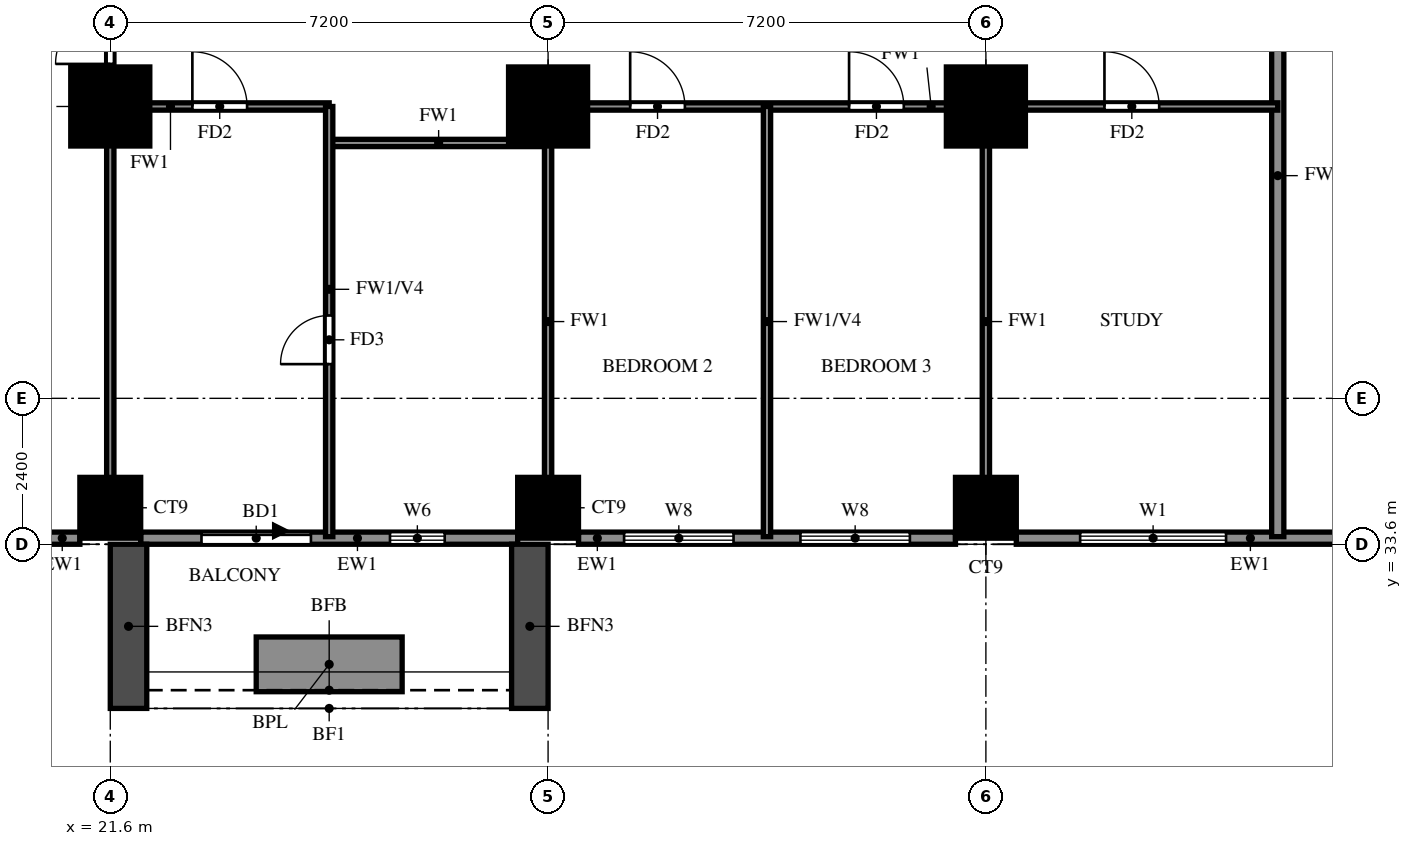
"""IFC4 building model, lengths in metres.
Left out: names, types, materials, properties, quantities, classifications, styles, units other than length and angle.
Written with IfcOpenShell. Run it as: python <this file> out.ifc"""

import sys

from ifc_helpers import new_model, si_unit, direction, frame, frame_2d, origin, origin_2d, place, context, subcontext, project, spatial, rectangle, extrude, source, transform, mapped, element, fill, save


model = new_model("IFC4")
c1 = context("Model", 3, precision=1e-05, world=origin(), true_north=direction((0.0, 1.0)))
c2 = subcontext(c1, "Body", "Model", "MODEL_VIEW")
j1 = project(units=[si_unit("LENGTHUNIT", "METRE"), si_unit("PLANEANGLEUNIT", "RADIAN")], contexts=[c1])
p1 = place(None, origin())
s1 = spatial("IfcSite", under=j1, at=p1, CompositionType="ELEMENT")
p2 = place(p1, origin())
s2 = spatial("IfcBuilding", under=s1, at=p2, CompositionType="ELEMENT")
p3 = place(p2, frame((0.0, 0.0, 72.5)))
s3 = spatial("IfcBuildingStorey", under=s2, at=p3, CompositionType="ELEMENT", Elevation=72.5)
m1 = source(origin(), c2, "Body", "SweptSolid", [
    extrude(rectangle(XDim=1.0, YDim=1.0, at=origin_2d()), origin(), (0.0, 0.0, 1.0), 3.18),
])
for number, where, z_axis, x_axis in (
    (1, (21.6, 34.2, 0.0), (0.0, 0.0, 1.0), (1.0, 0.0, 0.0)),
    (2, (28.8, 34.2, 0.0), (0.0, 0.0, 1.0), (1.0, 0.0, 0.0)),
    (3, (36.0, 34.2, 0.0), (0.0, 0.0, 1.0), (1.0, 0.0, 0.0)),
):
    element("IfcColumn", number, at=place(p3, frame(where, z_axis=z_axis, x_axis=x_axis)), inside=s3, PredefinedType="COLUMN", context=c2, shape_type="MappedRepresentation", body=[
        mapped(m1, transform((0.0, 0.0, 0.0))),
    ])
m2 = source(origin(), c2, "Body", "SweptSolid", [
    extrude(rectangle(XDim=1.3, YDim=1.3, at=origin_2d()), origin(), (0.0, 0.0, 1.0), 3.18),
])
for number, where, z_axis, x_axis in (
    (4, (21.6, 40.8, 0.0), (0.0, 0.0, 1.0), (1.0, 0.0, 0.0)),
    (5, (28.8, 40.8, 0.0), (0.0, 0.0, 1.0), (1.0, 0.0, 0.0)),
    (6, (36.0, 40.8, 0.0), (0.0, 0.0, 1.0), (1.0, 0.0, 0.0)),
):
    element("IfcColumn", number, at=place(p3, frame(where, z_axis=z_axis, x_axis=x_axis)), inside=s3, PredefinedType="COLUMN", context=c2, shape_type="MappedRepresentation", body=[
        mapped(m2, transform((0.0, 0.0, 0.0))),
    ])
p4 = place(p3, frame((18.2, 33.7, 0.0), z_axis=(0.0, 0.0, 1.0), x_axis=(1.0, 0.0, 0.0)))
e7 = element("IfcWall", 7, at=p4, inside=s3, PredefinedType="SOLIDWALL", context=c2, shape_type="SweptSolid", body=[
    extrude(rectangle(XDim=2.9, YDim=0.2, at=frame_2d((1.45, 0.0))), origin(), (0.0, 0.0, 1.0), 3.18),
])
p5 = place(p4, frame((0.55, 0.0, 0.6)))
e8 = element("IfcOpeningElement", 8, at=p5, cuts=e7, PredefinedType="OPENING", context=c2, shape_type="SweptSolid", body=[
    extrude(rectangle(XDim=1.8, YDim=2.4, at=frame_2d((0.9, 1.2))), frame((0.0, 0.11, 0.0), z_axis=(0.0, -1.0, 0.0), x_axis=(1.0, 0.0, 0.0)), (0.0, 0.0, 1.0), 0.22),
])
p6 = place(p3, frame((22.1, 33.7, 0.0), z_axis=(0.0, 0.0, 1.0), x_axis=(1.0, 0.0, 0.0)))
e9 = element("IfcWall", 9, at=p6, inside=s3, PredefinedType="SOLIDWALL", context=c2, shape_type="SweptSolid", body=[
    extrude(rectangle(XDim=6.2, YDim=0.2, at=frame_2d((3.1, 0.0))), origin(), (0.0, 0.0, 1.0), 3.18),
])
p7 = place(p6, frame((1.0, 0.0, 0.0)))
e10 = element("IfcOpeningElement", 10, at=p7, cuts=e9, PredefinedType="OPENING", context=c2, shape_type="SweptSolid", body=[
    extrude(rectangle(XDim=1.8, YDim=2.4, at=frame_2d((0.9, 1.2))), frame((0.0, 0.11, 0.0), z_axis=(0.0, -1.0, 0.0), x_axis=(1.0, 0.0, 0.0)), (0.0, 0.0, 1.0), 0.22),
])
p8 = place(p6, frame((4.1, 0.0, 1.5)))
e11 = element("IfcOpeningElement", 11, at=p8, cuts=e9, PredefinedType="OPENING", context=c2, shape_type="SweptSolid", body=[
    extrude(rectangle(XDim=0.9, YDim=0.9, at=frame_2d((0.45, 0.45))), frame((0.0, 0.11, 0.0), z_axis=(0.0, -1.0, 0.0), x_axis=(1.0, 0.0, 0.0)), (0.0, 0.0, 1.0), 0.22),
])
p9 = place(p3, frame((29.3, 33.7, 0.0), z_axis=(0.0, 0.0, 1.0), x_axis=(1.0, 0.0, 0.0)))
e12 = element("IfcWall", 12, at=p9, inside=s3, PredefinedType="SOLIDWALL", context=c2, shape_type="SweptSolid", body=[
    extrude(rectangle(XDim=6.2, YDim=0.2, at=frame_2d((3.1, 0.0))), origin(), (0.0, 0.0, 1.0), 3.18),
])
p10 = place(p9, frame((0.75, 0.0, 0.6)))
e13 = element("IfcOpeningElement", 13, at=p10, cuts=e12, PredefinedType="OPENING", context=c2, shape_type="SweptSolid", body=[
    extrude(rectangle(XDim=1.8, YDim=2.4, at=frame_2d((0.9, 1.2))), frame((0.0, 0.11, 0.0), z_axis=(0.0, -1.0, 0.0), x_axis=(1.0, 0.0, 0.0)), (0.0, 0.0, 1.0), 0.22),
])
p11 = place(p9, frame((3.65, 0.0, 0.6)))
e14 = element("IfcOpeningElement", 14, at=p11, cuts=e12, PredefinedType="OPENING", context=c2, shape_type="SweptSolid", body=[
    extrude(rectangle(XDim=1.8, YDim=2.4, at=frame_2d((0.9, 1.2))), frame((0.0, 0.11, 0.0), z_axis=(0.0, -1.0, 0.0), x_axis=(1.0, 0.0, 0.0)), (0.0, 0.0, 1.0), 0.22),
])
p12 = place(p3, frame((36.5, 33.7, 0.0), z_axis=(0.0, 0.0, 1.0), x_axis=(1.0, 0.0, 0.0)))
e15 = element("IfcWall", 15, at=p12, inside=s3, PredefinedType="SOLIDWALL", context=c2, shape_type="SweptSolid", body=[
    extrude(rectangle(XDim=5.5, YDim=0.2, at=frame_2d((2.75, 0.0))), origin(), (0.0, 0.0, 1.0), 3.18),
])
p13 = place(p12, frame((1.05, 0.0, 0.6)))
e16 = element("IfcOpeningElement", 16, at=p13, cuts=e15, PredefinedType="OPENING", context=c2, shape_type="SweptSolid", body=[
    extrude(rectangle(XDim=2.4, YDim=2.4, at=frame_2d((1.2, 1.2))), frame((0.0, 0.11, 0.0), z_axis=(0.0, -1.0, 0.0), x_axis=(1.0, 0.0, 0.0)), (0.0, 0.0, 1.0), 0.22),
])
for number, where, z_axis, x_axis in (
    (17, (21.9, 33.6, 0.0), (0.0, 0.0, 1.0), (0.0, -1.0, 0.0)),
    (18, (28.5, 33.6, 0.0), (0.0, 0.0, 1.0), (0.0, -1.0, 0.0)),
):
    element("IfcWall", number, at=place(p3, frame(where, z_axis=z_axis, x_axis=x_axis)), inside=s3, PredefinedType="SOLIDWALL", context=c2, shape_type="SweptSolid", body=[
        extrude(rectangle(XDim=2.7, YDim=0.6, at=frame_2d((1.35, 0.0))), origin(), (0.0, 0.0, 1.0), 2.85),
    ])
p14 = place(p3, frame((24.0, 31.625, 0.0), z_axis=(0.0, 0.0, 1.0), x_axis=(1.0, 0.0, 0.0)))
e19 = element("IfcWall", 19, at=p14, inside=s3, PredefinedType="SOLIDWALL", context=c2, shape_type="SweptSolid", body=[
    extrude(rectangle(XDim=2.4, YDim=0.9, at=frame_2d((1.2, 0.0))), origin(), (0.0, 0.0, 1.0), 0.9),
])
p15 = place(p3, frame((40.8, 33.725, 0.0), z_axis=(0.0, 0.0, 1.0), x_axis=(0.0, 1.0, 0.0)))
e20 = element("IfcWall", 20, at=p15, inside=s3, PredefinedType="SOLIDWALL", context=c2, shape_type="SweptSolid", body=[
    extrude(rectangle(XDim=11.875, YDim=0.2, at=frame_2d((5.938, 0.0))), origin(), (0.0, 0.0, 1.0), 2.28),
])
p16 = place(p3, frame((25.2, 40.2, 0.0), z_axis=(0.0, 0.0, 1.0), x_axis=(1.0, 0.0, 0.0)))
e21 = element("IfcWall", 21, at=p16, inside=s3, PredefinedType="PARTITIONING", context=c2, shape_type="SweptSolid", body=[
    extrude(rectangle(XDim=3.6, YDim=0.12, at=frame_2d((1.8, 0.0))), origin(), (0.0, 0.0, 1.0), 3.18),
])
p17 = place(p3, frame((21.6, 40.8, 0.0), z_axis=(0.0, 0.0, 1.0), x_axis=(1.0, 0.0, 0.0)))
e22 = element("IfcWall", 22, at=p17, inside=s3, PredefinedType="PARTITIONING", context=c2, shape_type="SweptSolid", body=[
    extrude(rectangle(XDim=3.6, YDim=0.12, at=frame_2d((1.8, 0.0))), origin(), (0.0, 0.0, 1.0), 3.18),
])
p18 = place(p17, frame((1.35, 0.0, 0.0)))
e23 = element("IfcOpeningElement", 23, at=p18, cuts=e22, PredefinedType="OPENING", context=c2, shape_type="SweptSolid", body=[
    extrude(rectangle(XDim=0.9, YDim=2.1, at=frame_2d((0.45, 1.05))), frame((0.0, 0.07, 0.0), z_axis=(0.0, -1.0, 0.0), x_axis=(1.0, 0.0, 0.0)), (0.0, 0.0, 1.0), 0.14),
])
p19 = place(p3, frame((28.8, 40.8, 0.0), z_axis=(0.0, 0.0, 1.0), x_axis=(1.0, 0.0, 0.0)))
e24 = element("IfcWall", 24, at=p19, inside=s3, PredefinedType="PARTITIONING", context=c2, shape_type="SweptSolid", body=[
    extrude(rectangle(XDim=12.0, YDim=0.12, at=frame_2d((6.0, 0.0))), origin(), (0.0, 0.0, 1.0), 3.18),
])
p20 = place(p19, frame((1.35, 0.0, 0.0)))
e25 = element("IfcOpeningElement", 25, at=p20, cuts=e24, PredefinedType="OPENING", context=c2, shape_type="SweptSolid", body=[
    extrude(rectangle(XDim=0.9, YDim=2.1, at=frame_2d((0.45, 1.05))), frame((0.0, 0.07, 0.0), z_axis=(0.0, -1.0, 0.0), x_axis=(1.0, 0.0, 0.0)), (0.0, 0.0, 1.0), 0.14),
])
p21 = place(p19, frame((4.95, 0.0, 0.0)))
e26 = element("IfcOpeningElement", 26, at=p21, cuts=e24, PredefinedType="OPENING", context=c2, shape_type="SweptSolid", body=[
    extrude(rectangle(XDim=0.9, YDim=2.1, at=frame_2d((0.45, 1.05))), frame((0.0, 0.07, 0.0), z_axis=(0.0, -1.0, 0.0), x_axis=(1.0, 0.0, 0.0)), (0.0, 0.0, 1.0), 0.14),
])
p22 = place(p19, frame((9.15, 0.0, 0.0)))
e27 = element("IfcOpeningElement", 27, at=p22, cuts=e24, PredefinedType="OPENING", context=c2, shape_type="SweptSolid", body=[
    extrude(rectangle(XDim=0.9, YDim=2.1, at=frame_2d((0.45, 1.05))), frame((0.0, 0.07, 0.0), z_axis=(0.0, -1.0, 0.0), x_axis=(1.0, 0.0, 0.0)), (0.0, 0.0, 1.0), 0.14),
])
p23 = place(p3, frame((21.6, 33.725, 0.0), z_axis=(0.0, 0.0, 1.0), x_axis=(0.0, 1.0, 0.0)))
e28 = element("IfcWall", 28, at=p23, inside=s3, PredefinedType="PARTITIONING", context=c2, shape_type="SweptSolid", body=[
    extrude(rectangle(XDim=39.475, YDim=0.12, at=frame_2d((19.737, 0.0))), origin(), (0.0, 0.0, 1.0), 3.18),
])
p24 = place(p23, frame((7.775, 0.0, 0.0)))
e29 = element("IfcOpeningElement", 29, at=p24, cuts=e28, PredefinedType="OPENING", context=c2, shape_type="SweptSolid", body=[
    extrude(rectangle(XDim=0.9, YDim=2.1, at=frame_2d((0.45, 1.05))), frame((0.0, 0.07, 0.0), z_axis=(0.0, -1.0, 0.0), x_axis=(1.0, 0.0, 0.0)), (0.0, 0.0, 1.0), 0.14),
])
p25 = place(p23, frame((17.125, 0.0, 0.0)))
e30 = element("IfcOpeningElement", 30, at=p25, cuts=e28, PredefinedType="OPENING", context=c2, shape_type="SweptSolid", body=[
    extrude(rectangle(XDim=1.5, YDim=2.1, at=frame_2d((0.75, 1.05))), frame((0.0, 0.07, 0.0), z_axis=(0.0, -1.0, 0.0), x_axis=(1.0, 0.0, 0.0)), (0.0, 0.0, 1.0), 0.14),
])
p26 = place(p23, frame((22.825, 0.0, 0.0)))
e31 = element("IfcOpeningElement", 31, at=p26, cuts=e28, PredefinedType="OPENING", context=c2, shape_type="SweptSolid", body=[
    extrude(rectangle(XDim=0.9, YDim=2.1, at=frame_2d((0.45, 1.05))), frame((0.0, 0.07, 0.0), z_axis=(0.0, -1.0, 0.0), x_axis=(1.0, 0.0, 0.0)), (0.0, 0.0, 1.0), 0.14),
])
p27 = place(p23, frame((26.425, 0.0, 0.0)))
e32 = element("IfcOpeningElement", 32, at=p27, cuts=e28, PredefinedType="OPENING", context=c2, shape_type="SweptSolid", body=[
    extrude(rectangle(XDim=0.9, YDim=2.1, at=frame_2d((0.45, 1.05))), frame((0.0, 0.07, 0.0), z_axis=(0.0, -1.0, 0.0), x_axis=(1.0, 0.0, 0.0)), (0.0, 0.0, 1.0), 0.14),
])
p28 = place(p23, frame((30.025, 0.0, 0.0)))
e33 = element("IfcOpeningElement", 33, at=p28, cuts=e28, PredefinedType="OPENING", context=c2, shape_type="SweptSolid", body=[
    extrude(rectangle(XDim=0.9, YDim=2.1, at=frame_2d((0.45, 1.05))), frame((0.0, 0.07, 0.0), z_axis=(0.0, -1.0, 0.0), x_axis=(1.0, 0.0, 0.0)), (0.0, 0.0, 1.0), 0.14),
])
p29 = place(p23, frame((33.625, 0.0, 0.0)))
e34 = element("IfcOpeningElement", 34, at=p29, cuts=e28, PredefinedType="OPENING", context=c2, shape_type="SweptSolid", body=[
    extrude(rectangle(XDim=0.9, YDim=2.1, at=frame_2d((0.45, 1.05))), frame((0.0, 0.07, 0.0), z_axis=(0.0, -1.0, 0.0), x_axis=(1.0, 0.0, 0.0)), (0.0, 0.0, 1.0), 0.14),
])
p30 = place(p23, frame((37.225, 0.0, 0.0)))
e35 = element("IfcOpeningElement", 35, at=p30, cuts=e28, PredefinedType="OPENING", context=c2, shape_type="SweptSolid", body=[
    extrude(rectangle(XDim=0.9, YDim=2.1, at=frame_2d((0.45, 1.05))), frame((0.0, 0.07, 0.0), z_axis=(0.0, -1.0, 0.0), x_axis=(1.0, 0.0, 0.0)), (0.0, 0.0, 1.0), 0.14),
])
p31 = place(p3, frame((25.2, 33.725, 0.0), z_axis=(0.0, 0.0, 1.0), x_axis=(0.0, 1.0, 0.0)))
e36 = element("IfcWall", 36, at=p31, inside=s3, PredefinedType="PARTITIONING", context=c2, shape_type="SweptSolid", body=[
    extrude(rectangle(XDim=7.075, YDim=0.12, at=frame_2d((3.538, 0.0))), origin(), (0.0, 0.0, 1.0), 2.28),
])
p32 = place(p31, frame((2.837, 0.0, 0.0)))
e37 = element("IfcOpeningElement", 37, at=p32, cuts=e36, PredefinedType="OPENING", context=c2, shape_type="SweptSolid", body=[
    extrude(rectangle(XDim=0.8, YDim=2.1, at=frame_2d((0.4, 1.05))), frame((0.0, 0.07, 0.0), z_axis=(0.0, -1.0, 0.0), x_axis=(1.0, 0.0, 0.0)), (0.0, 0.0, 1.0), 0.14),
])
p33 = place(p3, frame((28.8, 33.725, 0.0), z_axis=(0.0, 0.0, 1.0), x_axis=(0.0, 1.0, 0.0)))
e38 = element("IfcWall", 38, at=p33, inside=s3, PredefinedType="PARTITIONING", context=c2, shape_type="SweptSolid", body=[
    extrude(rectangle(XDim=7.075, YDim=0.12, at=frame_2d((3.538, 0.0))), origin(), (0.0, 0.0, 1.0), 3.18),
])
p34 = place(p3, frame((32.4, 33.725, 0.0), z_axis=(0.0, 0.0, 1.0), x_axis=(0.0, 1.0, 0.0)))
e39 = element("IfcWall", 39, at=p34, inside=s3, PredefinedType="PARTITIONING", context=c2, shape_type="SweptSolid", body=[
    extrude(rectangle(XDim=7.075, YDim=0.12, at=frame_2d((3.538, 0.0))), origin(), (0.0, 0.0, 1.0), 2.28),
])
p35 = place(p3, frame((36.0, 33.725, 0.0), z_axis=(0.0, 0.0, 1.0), x_axis=(0.0, 1.0, 0.0)))
e40 = element("IfcWall", 40, at=p35, inside=s3, PredefinedType="PARTITIONING", context=c2, shape_type="SweptSolid", body=[
    extrude(rectangle(XDim=7.075, YDim=0.12, at=frame_2d((3.538, 0.0))), origin(), (0.0, 0.0, 1.0), 3.18),
])
p36 = place(p7, origin())
e41 = element("IfcDoor", 41, at=p36, inside=s3, OperationType="DOUBLE_DOOR_SLIDING", PredefinedType="DOOR", context=c2, shape_type="SweptSolid", body=[
    extrude(rectangle(XDim=1.8, YDim=2.4, at=frame_2d((0.9, 1.2))), frame((0.0, 0.025, 0.0), z_axis=(0.0, -1.0, 0.0), x_axis=(1.0, 0.0, 0.0)), (0.0, 0.0, 1.0), 0.05),
])
fill(e10, e41)
p37 = place(p8, origin())
e42 = element("IfcWindow", 42, at=p37, inside=s3, PartitioningType="SINGLE_PANEL", PredefinedType="WINDOW", context=c2, shape_type="SweptSolid", body=[
    extrude(rectangle(XDim=0.9, YDim=0.9, at=frame_2d((0.45, 0.45))), frame((0.0, 0.03, 0.0), z_axis=(0.0, -1.0, 0.0), x_axis=(1.0, 0.0, 0.0)), (0.0, 0.0, 1.0), 0.06),
])
fill(e11, e42)
p38 = place(p10, origin())
e43 = element("IfcWindow", 43, at=p38, inside=s3, PartitioningType="DOUBLE_PANEL_VERTICAL", PredefinedType="WINDOW", context=c2, shape_type="SweptSolid", body=[
    extrude(rectangle(XDim=1.8, YDim=2.4, at=frame_2d((0.9, 1.2))), frame((0.0, 0.03, 0.0), z_axis=(0.0, -1.0, 0.0), x_axis=(1.0, 0.0, 0.0)), (0.0, 0.0, 1.0), 0.06),
])
fill(e13, e43)
p39 = place(p11, origin())
e44 = element("IfcWindow", 44, at=p39, inside=s3, PartitioningType="DOUBLE_PANEL_VERTICAL", PredefinedType="WINDOW", context=c2, shape_type="SweptSolid", body=[
    extrude(rectangle(XDim=1.8, YDim=2.4, at=frame_2d((0.9, 1.2))), frame((0.0, 0.03, 0.0), z_axis=(0.0, -1.0, 0.0), x_axis=(1.0, 0.0, 0.0)), (0.0, 0.0, 1.0), 0.06),
])
fill(e14, e44)
p40 = place(p13, origin())
e45 = element("IfcWindow", 45, at=p40, inside=s3, PartitioningType="DOUBLE_PANEL_VERTICAL", PredefinedType="WINDOW", context=c2, shape_type="SweptSolid", body=[
    extrude(rectangle(XDim=2.4, YDim=2.4, at=frame_2d((1.2, 1.2))), frame((0.0, 0.03, 0.0), z_axis=(0.0, -1.0, 0.0), x_axis=(1.0, 0.0, 0.0)), (0.0, 0.0, 1.0), 0.06),
])
fill(e16, e45)
p41 = place(p24, origin())
e46 = element("IfcDoor", 46, at=p41, inside=s3, OperationType="SINGLE_SWING_RIGHT", PredefinedType="DOOR", context=c2, shape_type="SweptSolid", body=[
    extrude(rectangle(XDim=0.9, YDim=2.1, at=frame_2d((0.45, 1.05))), frame((0.0, 0.025, 0.0), z_axis=(0.0, -1.0, 0.0), x_axis=(1.0, 0.0, 0.0)), (0.0, 0.0, 1.0), 0.05),
])
fill(e29, e46)
p42 = place(p18, origin())
e47 = element("IfcDoor", 47, at=p42, inside=s3, OperationType="SINGLE_SWING_LEFT", PredefinedType="DOOR", context=c2, shape_type="SweptSolid", body=[
    extrude(rectangle(XDim=0.9, YDim=2.1, at=frame_2d((0.45, 1.05))), frame((0.0, 0.025, 0.0), z_axis=(0.0, -1.0, 0.0), x_axis=(1.0, 0.0, 0.0)), (0.0, 0.0, 1.0), 0.05),
])
fill(e23, e47)
p43 = place(p32, origin())
e48 = element("IfcDoor", 48, at=p43, inside=s3, OperationType="SINGLE_SWING_RIGHT", PredefinedType="DOOR", context=c2, shape_type="SweptSolid", body=[
    extrude(rectangle(XDim=0.8, YDim=2.1, at=frame_2d((0.4, 1.05))), frame((0.0, 0.025, 0.0), z_axis=(0.0, -1.0, 0.0), x_axis=(1.0, 0.0, 0.0)), (0.0, 0.0, 1.0), 0.05),
])
fill(e37, e48)
p44 = place(p20, origin())
e49 = element("IfcDoor", 49, at=p44, inside=s3, OperationType="SINGLE_SWING_LEFT", PredefinedType="DOOR", context=c2, shape_type="SweptSolid", body=[
    extrude(rectangle(XDim=0.9, YDim=2.1, at=frame_2d((0.45, 1.05))), frame((0.0, 0.025, 0.0), z_axis=(0.0, -1.0, 0.0), x_axis=(1.0, 0.0, 0.0)), (0.0, 0.0, 1.0), 0.05),
])
fill(e25, e49)
p45 = place(p21, origin())
e50 = element("IfcDoor", 50, at=p45, inside=s3, OperationType="SINGLE_SWING_LEFT", PredefinedType="DOOR", context=c2, shape_type="SweptSolid", body=[
    extrude(rectangle(XDim=0.9, YDim=2.1, at=frame_2d((0.45, 1.05))), frame((0.0, 0.025, 0.0), z_axis=(0.0, -1.0, 0.0), x_axis=(1.0, 0.0, 0.0)), (0.0, 0.0, 1.0), 0.05),
])
fill(e26, e50)
p46 = place(p22, origin())
e51 = element("IfcDoor", 51, at=p46, inside=s3, OperationType="SINGLE_SWING_RIGHT", PredefinedType="DOOR", context=c2, shape_type="SweptSolid", body=[
    extrude(rectangle(XDim=0.9, YDim=2.1, at=frame_2d((0.45, 1.05))), frame((0.0, 0.025, 0.0), z_axis=(0.0, -1.0, 0.0), x_axis=(1.0, 0.0, 0.0)), (0.0, 0.0, 1.0), 0.05),
])
fill(e27, e51)
save(model, sys.argv[1])
